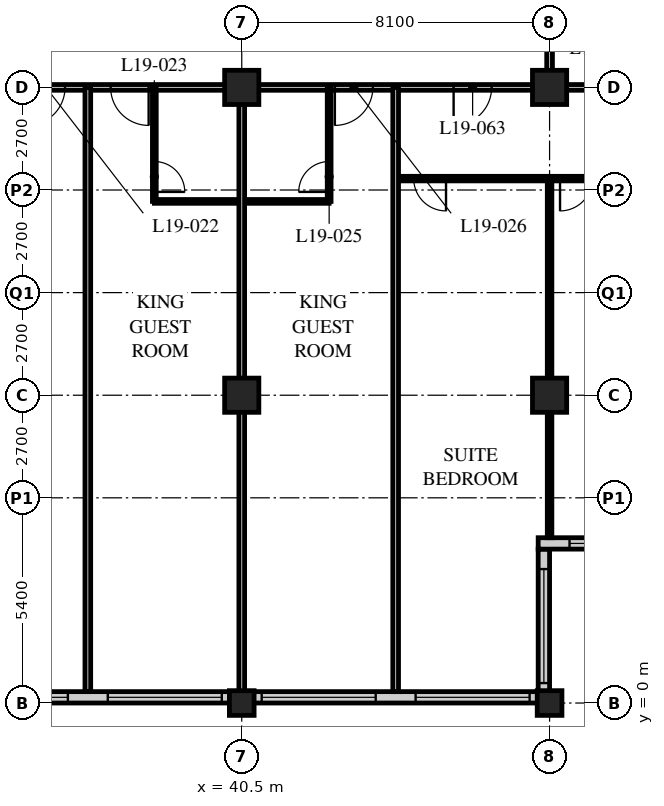
"""IFC4 building model, lengths in metres.
Left out: names, types, materials, properties, quantities, classifications, styles, units other than length and angle.
Written with IfcOpenShell. Run it as: python <this file> out.ifc"""

import sys

from ifc_helpers import new_model, si_unit, direction, frame, frame_2d, origin, origin_2d, place, context, subcontext, project, spatial, rectangle, hollow_rectangle, extrude, element, fill, save


model = new_model("IFC4")
c1 = context("Model", 3, precision=1e-05, world=origin(), true_north=direction((0.0, 1.0)))
c2 = subcontext(c1, "Body", "Model", "MODEL_VIEW")
j1 = project(units=[si_unit("LENGTHUNIT", "METRE"), si_unit("PLANEANGLEUNIT", "RADIAN")], contexts=[c1])
p1 = place(None, origin())
s1 = spatial("IfcSite", under=j1, at=p1, CompositionType="ELEMENT")
p2 = place(p1, origin())
s2 = spatial("IfcBuilding", under=s1, at=p2, CompositionType="ELEMENT")
p3 = place(p2, frame((0.0, 0.0, 77.2)))
s3 = spatial("IfcBuildingStorey", under=s2, at=p3, CompositionType="ELEMENT", Elevation=77.2)
p4 = place(p3, frame((40.5, 0.0, 0.0), z_axis=(0.0, 0.0, 1.0), x_axis=(1.0, 0.0, 0.0)))
e1 = element("IfcColumn", 1, at=p4, inside=s3, PredefinedType="COLUMN", context=c2, shape_type="SweptSolid", body=[
    extrude(hollow_rectangle(XDim=0.65, YDim=0.65, WallThickness=0.05, at=origin_2d()), origin(), (0.0, 0.0, 1.0), 3.4),
])
for number, where, z_axis, x_axis in (
    (2, (40.5, 8.1, 0.0), (0.0, 0.0, 1.0), (1.0, 0.0, 0.0)),
    (3, (40.5, 16.2, 0.0), (0.0, 0.0, 1.0), (1.0, 0.0, 0.0)),
):
    element("IfcColumn", number, at=place(p3, frame(where, z_axis=z_axis, x_axis=x_axis)), inside=s3, PredefinedType="COLUMN", context=c2, shape_type="SweptSolid", body=[
        extrude(hollow_rectangle(XDim=0.9, YDim=0.9, WallThickness=0.09, at=origin_2d()), origin(), (0.0, 0.0, 1.0), 3.4),
    ])
p5 = place(p3, frame((48.6, 0.0, 0.0), z_axis=(0.0, 0.0, 1.0), x_axis=(1.0, 0.0, 0.0)))
e4 = element("IfcColumn", 4, at=p5, inside=s3, PredefinedType="COLUMN", context=c2, shape_type="SweptSolid", body=[
    extrude(hollow_rectangle(XDim=0.65, YDim=0.65, WallThickness=0.05, at=origin_2d()), origin(), (0.0, 0.0, 1.0), 3.4),
])
for number, where, z_axis, x_axis in (
    (5, (48.6, 8.1, 0.0), (0.0, 0.0, 1.0), (1.0, 0.0, 0.0)),
    (6, (48.6, 16.2, 0.0), (0.0, 0.0, 1.0), (1.0, 0.0, 0.0)),
):
    element("IfcColumn", number, at=place(p3, frame(where, z_axis=z_axis, x_axis=x_axis)), inside=s3, PredefinedType="COLUMN", context=c2, shape_type="SweptSolid", body=[
        extrude(hollow_rectangle(XDim=0.9, YDim=0.9, WallThickness=0.09, at=origin_2d()), origin(), (0.0, 0.0, 1.0), 3.4),
    ])
p6 = place(p3, frame((8.4, 0.15, 0.0), z_axis=(0.0, 0.0, 1.0), x_axis=(1.0, 0.0, 0.0)))
e7 = element("IfcWall", 7, at=p6, inside=s3, PredefinedType="SOLIDWALL", context=c2, shape_type="SweptSolid", body=[
    extrude(rectangle(XDim=40.2, YDim=0.3, at=frame_2d((20.1, 0.0))), origin(), (0.0, 0.0, 1.0), 3.19),
])
p7 = place(p6, frame((0.225, 0.0, 0.9)))
e8 = element("IfcOpeningElement", 8, at=p7, cuts=e7, PredefinedType="OPENING", context=c2, shape_type="SweptSolid", body=[
    extrude(rectangle(XDim=3.0, YDim=1.5, at=frame_2d((1.5, 0.75))), frame((0.0, 0.16, 0.0), z_axis=(0.0, -1.0, 0.0), x_axis=(1.0, 0.0, 0.0)), (0.0, 0.0, 1.0), 0.32),
])
p8 = place(p6, frame((4.275, 0.0, 0.9)))
e9 = element("IfcOpeningElement", 9, at=p8, cuts=e7, PredefinedType="OPENING", context=c2, shape_type="SweptSolid", body=[
    extrude(rectangle(XDim=3.0, YDim=1.5, at=frame_2d((1.5, 0.75))), frame((0.0, 0.16, 0.0), z_axis=(0.0, -1.0, 0.0), x_axis=(1.0, 0.0, 0.0)), (0.0, 0.0, 1.0), 0.32),
])
p9 = place(p6, frame((8.325, 0.0, 0.9)))
e10 = element("IfcOpeningElement", 10, at=p9, cuts=e7, PredefinedType="OPENING", context=c2, shape_type="SweptSolid", body=[
    extrude(rectangle(XDim=3.0, YDim=1.5, at=frame_2d((1.5, 0.75))), frame((0.0, 0.16, 0.0), z_axis=(0.0, -1.0, 0.0), x_axis=(1.0, 0.0, 0.0)), (0.0, 0.0, 1.0), 0.32),
])
p10 = place(p6, frame((12.375, 0.0, 0.9)))
e11 = element("IfcOpeningElement", 11, at=p10, cuts=e7, PredefinedType="OPENING", context=c2, shape_type="SweptSolid", body=[
    extrude(rectangle(XDim=3.0, YDim=1.5, at=frame_2d((1.5, 0.75))), frame((0.0, 0.16, 0.0), z_axis=(0.0, -1.0, 0.0), x_axis=(1.0, 0.0, 0.0)), (0.0, 0.0, 1.0), 0.32),
])
p11 = place(p6, frame((16.425, 0.0, 0.9)))
e12 = element("IfcOpeningElement", 12, at=p11, cuts=e7, PredefinedType="OPENING", context=c2, shape_type="SweptSolid", body=[
    extrude(rectangle(XDim=3.0, YDim=1.5, at=frame_2d((1.5, 0.75))), frame((0.0, 0.16, 0.0), z_axis=(0.0, -1.0, 0.0), x_axis=(1.0, 0.0, 0.0)), (0.0, 0.0, 1.0), 0.32),
])
p12 = place(p6, frame((20.475, 0.0, 0.9)))
e13 = element("IfcOpeningElement", 13, at=p12, cuts=e7, PredefinedType="OPENING", context=c2, shape_type="SweptSolid", body=[
    extrude(rectangle(XDim=3.0, YDim=1.5, at=frame_2d((1.5, 0.75))), frame((0.0, 0.16, 0.0), z_axis=(0.0, -1.0, 0.0), x_axis=(1.0, 0.0, 0.0)), (0.0, 0.0, 1.0), 0.32),
])
p13 = place(p6, frame((24.525, 0.0, 0.9)))
e14 = element("IfcOpeningElement", 14, at=p13, cuts=e7, PredefinedType="OPENING", context=c2, shape_type="SweptSolid", body=[
    extrude(rectangle(XDim=3.0, YDim=1.5, at=frame_2d((1.5, 0.75))), frame((0.0, 0.16, 0.0), z_axis=(0.0, -1.0, 0.0), x_axis=(1.0, 0.0, 0.0)), (0.0, 0.0, 1.0), 0.32),
])
p14 = place(p6, frame((28.575, 0.0, 0.9)))
e15 = element("IfcOpeningElement", 15, at=p14, cuts=e7, PredefinedType="OPENING", context=c2, shape_type="SweptSolid", body=[
    extrude(rectangle(XDim=3.0, YDim=1.5, at=frame_2d((1.5, 0.75))), frame((0.0, 0.16, 0.0), z_axis=(0.0, -1.0, 0.0), x_axis=(1.0, 0.0, 0.0)), (0.0, 0.0, 1.0), 0.32),
])
p15 = place(p6, frame((32.625, 0.0, 0.9)))
e16 = element("IfcOpeningElement", 16, at=p15, cuts=e7, PredefinedType="OPENING", context=c2, shape_type="SweptSolid", body=[
    extrude(rectangle(XDim=3.0, YDim=1.5, at=frame_2d((1.5, 0.75))), frame((0.0, 0.16, 0.0), z_axis=(0.0, -1.0, 0.0), x_axis=(1.0, 0.0, 0.0)), (0.0, 0.0, 1.0), 0.32),
])
p16 = place(p6, frame((36.675, 0.0, 0.9)))
e17 = element("IfcOpeningElement", 17, at=p16, cuts=e7, PredefinedType="OPENING", context=c2, shape_type="SweptSolid", body=[
    extrude(rectangle(XDim=3.0, YDim=1.5, at=frame_2d((1.5, 0.75))), frame((0.0, 0.16, 0.0), z_axis=(0.0, -1.0, 0.0), x_axis=(1.0, 0.0, 0.0)), (0.0, 0.0, 1.0), 0.32),
])
p17 = place(p3, frame((48.45, 0.3, 0.0), z_axis=(0.0, 0.0, 1.0), x_axis=(0.0, 1.0, 0.0)))
e18 = element("IfcWall", 18, at=p17, inside=s3, PredefinedType="SOLIDWALL", context=c2, shape_type="SweptSolid", body=[
    extrude(rectangle(XDim=3.75, YDim=0.3, at=frame_2d((1.875, 0.0))), origin(), (0.0, 0.0, 1.0), 3.19),
])
p18 = place(p17, frame((0.225, 0.0, 0.9)))
e19 = element("IfcOpeningElement", 19, at=p18, cuts=e18, PredefinedType="OPENING", context=c2, shape_type="SweptSolid", body=[
    extrude(rectangle(XDim=3.0, YDim=1.5, at=frame_2d((1.5, 0.75))), frame((0.0, 0.16, 0.0), z_axis=(0.0, -1.0, 0.0), x_axis=(1.0, 0.0, 0.0)), (0.0, 0.0, 1.0), 0.32),
])
p19 = place(p3, frame((48.3, 4.2, 0.0), z_axis=(0.0, 0.0, 1.0), x_axis=(1.0, 0.0, 0.0)))
e20 = element("IfcWall", 20, at=p19, inside=s3, PredefinedType="SOLIDWALL", context=c2, shape_type="SweptSolid", body=[
    extrude(rectangle(XDim=4.35, YDim=0.3, at=frame_2d((2.175, 0.0))), origin(), (0.0, 0.0, 1.0), 3.19),
])
p20 = place(p19, frame((0.825, 0.0, 0.9)))
e21 = element("IfcOpeningElement", 21, at=p20, cuts=e20, PredefinedType="OPENING", context=c2, shape_type="SweptSolid", body=[
    extrude(rectangle(XDim=3.0, YDim=1.5, at=frame_2d((1.5, 0.75))), frame((0.0, 0.16, 0.0), z_axis=(0.0, -1.0, 0.0), x_axis=(1.0, 0.0, 0.0)), (0.0, 0.0, 1.0), 0.32),
])
p21 = place(p3, frame((12.15, 16.2, 0.0), z_axis=(0.0, 0.0, 1.0), x_axis=(1.0, 0.0, 0.0)))
e22 = element("IfcWall", 22, at=p21, inside=s3, PredefinedType="PARTITIONING", context=c2, shape_type="SweptSolid", body=[
    extrude(rectangle(XDim=36.45, YDim=0.15, at=frame_2d((18.225, 0.0))), origin(), (0.0, 0.0, 1.0), 2.428),
])
p22 = place(p21, frame((6.5, 0.0, 0.0)))
e23 = element("IfcOpeningElement", 23, at=p22, cuts=e22, PredefinedType="OPENING", context=c2, shape_type="SweptSolid", body=[
    extrude(rectangle(XDim=1.0, YDim=2.1, at=frame_2d((0.5, 1.05))), frame((0.0, 0.085, 0.0), z_axis=(0.0, -1.0, 0.0), x_axis=(1.0, 0.0, 0.0)), (0.0, 0.0, 1.0), 0.17),
])
p23 = place(p21, frame((8.4, 0.0, 0.0)))
e24 = element("IfcOpeningElement", 24, at=p23, cuts=e22, PredefinedType="OPENING", context=c2, shape_type="SweptSolid", body=[
    extrude(rectangle(XDim=1.0, YDim=2.1, at=frame_2d((0.5, 1.05))), frame((0.0, 0.085, 0.0), z_axis=(0.0, -1.0, 0.0), x_axis=(1.0, 0.0, 0.0)), (0.0, 0.0, 1.0), 0.17),
])
p24 = place(p21, frame((14.9, 0.0, 0.0)))
e25 = element("IfcOpeningElement", 25, at=p24, cuts=e22, PredefinedType="OPENING", context=c2, shape_type="SweptSolid", body=[
    extrude(rectangle(XDim=1.0, YDim=2.1, at=frame_2d((0.5, 1.05))), frame((0.0, 0.085, 0.0), z_axis=(0.0, -1.0, 0.0), x_axis=(1.0, 0.0, 0.0)), (0.0, 0.0, 1.0), 0.17),
])
p25 = place(p21, frame((16.5, 0.0, 0.0)))
e26 = element("IfcOpeningElement", 26, at=p25, cuts=e22, PredefinedType="OPENING", context=c2, shape_type="SweptSolid", body=[
    extrude(rectangle(XDim=1.0, YDim=2.1, at=frame_2d((0.5, 1.05))), frame((0.0, 0.085, 0.0), z_axis=(0.0, -1.0, 0.0), x_axis=(1.0, 0.0, 0.0)), (0.0, 0.0, 1.0), 0.17),
])
p26 = place(p21, frame((22.7, 0.0, 0.0)))
e27 = element("IfcOpeningElement", 27, at=p26, cuts=e22, PredefinedType="OPENING", context=c2, shape_type="SweptSolid", body=[
    extrude(rectangle(XDim=1.0, YDim=2.1, at=frame_2d((0.5, 1.05))), frame((0.0, 0.085, 0.0), z_axis=(0.0, -1.0, 0.0), x_axis=(1.0, 0.0, 0.0)), (0.0, 0.0, 1.0), 0.17),
])
p27 = place(p21, frame((24.9, 0.0, 0.0)))
e28 = element("IfcOpeningElement", 28, at=p27, cuts=e22, PredefinedType="OPENING", context=c2, shape_type="SweptSolid", body=[
    extrude(rectangle(XDim=1.0, YDim=2.1, at=frame_2d((0.5, 1.05))), frame((0.0, 0.085, 0.0), z_axis=(0.0, -1.0, 0.0), x_axis=(1.0, 0.0, 0.0)), (0.0, 0.0, 1.0), 0.17),
])
p28 = place(p21, frame((30.8, 0.0, 0.0)))
e29 = element("IfcOpeningElement", 29, at=p28, cuts=e22, PredefinedType="OPENING", context=c2, shape_type="SweptSolid", body=[
    extrude(rectangle(XDim=1.0, YDim=2.1, at=frame_2d((0.5, 1.05))), frame((0.0, 0.085, 0.0), z_axis=(0.0, -1.0, 0.0), x_axis=(1.0, 0.0, 0.0)), (0.0, 0.0, 1.0), 0.17),
])
p29 = place(p21, frame((1.525, 0.0, 0.0)))
e30 = element("IfcOpeningElement", 30, at=p29, cuts=e22, PredefinedType="OPENING", context=c2, shape_type="SweptSolid", body=[
    extrude(rectangle(XDim=1.0, YDim=2.1, at=frame_2d((0.5, 1.05))), frame((0.0, 0.085, 0.0), z_axis=(0.0, -1.0, 0.0), x_axis=(1.0, 0.0, 0.0)), (0.0, 0.0, 1.0), 0.17),
])
p30 = place(p21, frame((33.925, 0.0, 0.0)))
e31 = element("IfcOpeningElement", 31, at=p30, cuts=e22, PredefinedType="OPENING", context=c2, shape_type="SweptSolid", body=[
    extrude(rectangle(XDim=1.0, YDim=2.1, at=frame_2d((0.5, 1.05))), frame((0.0, 0.085, 0.0), z_axis=(0.0, -1.0, 0.0), x_axis=(1.0, 0.0, 0.0)), (0.0, 0.0, 1.0), 0.17),
])
p31 = place(p3, frame((48.6, 16.2, 0.0), z_axis=(0.0, 0.0, 1.0), x_axis=(0.0, 1.0, 0.0)))
e32 = element("IfcWall", 32, at=p31, inside=s3, PredefinedType="PARTITIONING", context=c2, shape_type="SweptSolid", body=[
    extrude(rectangle(XDim=26.1, YDim=0.15, at=frame_2d((13.05, 0.0))), origin(), (0.0, 0.0, 1.0), 2.428),
])
p32 = place(p31, frame((2.75, 0.0, 0.0)))
e33 = element("IfcOpeningElement", 33, at=p32, cuts=e32, PredefinedType="OPENING", context=c2, shape_type="SweptSolid", body=[
    extrude(rectangle(XDim=1.0, YDim=2.1, at=frame_2d((0.5, 1.05))), frame((0.0, 0.085, 0.0), z_axis=(0.0, -1.0, 0.0), x_axis=(1.0, 0.0, 0.0)), (0.0, 0.0, 1.0), 0.17),
])
p33 = place(p31, frame((4.65, 0.0, 0.0)))
e34 = element("IfcOpeningElement", 34, at=p33, cuts=e32, PredefinedType="OPENING", context=c2, shape_type="SweptSolid", body=[
    extrude(rectangle(XDim=1.0, YDim=2.1, at=frame_2d((0.5, 1.05))), frame((0.0, 0.085, 0.0), z_axis=(0.0, -1.0, 0.0), x_axis=(1.0, 0.0, 0.0)), (0.0, 0.0, 1.0), 0.17),
])
p34 = place(p31, frame((13.55, 0.0, 0.0)))
e35 = element("IfcOpeningElement", 35, at=p34, cuts=e32, PredefinedType="OPENING", context=c2, shape_type="SweptSolid", body=[
    extrude(rectangle(XDim=1.0, YDim=2.1, at=frame_2d((0.5, 1.05))), frame((0.0, 0.085, 0.0), z_axis=(0.0, -1.0, 0.0), x_axis=(1.0, 0.0, 0.0)), (0.0, 0.0, 1.0), 0.17),
])
p35 = place(p31, frame((21.65, 0.0, 0.0)))
e36 = element("IfcOpeningElement", 36, at=p35, cuts=e32, PredefinedType="OPENING", context=c2, shape_type="SweptSolid", body=[
    extrude(rectangle(XDim=1.0, YDim=2.1, at=frame_2d((0.5, 1.05))), frame((0.0, 0.085, 0.0), z_axis=(0.0, -1.0, 0.0), x_axis=(1.0, 0.0, 0.0)), (0.0, 0.0, 1.0), 0.17),
])
p36 = place(p3, frame((36.45, 16.2, 0.0), z_axis=(0.0, 0.0, 1.0), x_axis=(0.0, -1.0, 0.0)))
e37 = element("IfcWall", 37, at=p36, inside=s3, PredefinedType="PARTITIONING", context=c2, shape_type="SweptSolid", body=[
    extrude(rectangle(XDim=15.9, YDim=0.15, at=frame_2d((7.95, 0.0))), origin(), (0.0, 0.0, 1.0), 3.19),
])
p37 = place(p3, frame((38.2, 13.2, 0.0), z_axis=(0.0, 0.0, 1.0), x_axis=(1.0, 0.0, 0.0)))
e38 = element("IfcWall", 38, at=p37, inside=s3, PredefinedType="PARTITIONING", context=c2, shape_type="SweptSolid", body=[
    extrude(rectangle(XDim=4.6, YDim=0.1, at=frame_2d((2.3, 0.0))), origin(), (0.0, 0.0, 1.0), 3.19),
])
p38 = place(p3, frame((38.2, 16.2, 0.0), z_axis=(0.0, 0.0, 1.0), x_axis=(0.0, -1.0, 0.0)))
e39 = element("IfcWall", 39, at=p38, inside=s3, PredefinedType="PARTITIONING", context=c2, shape_type="SweptSolid", body=[
    extrude(rectangle(XDim=3.0, YDim=0.1, at=frame_2d((1.5, 0.0))), origin(), (0.0, 0.0, 1.0), 3.19),
])
p39 = place(p38, frame((1.95, 0.0, 0.0)))
e40 = element("IfcOpeningElement", 40, at=p39, cuts=e39, PredefinedType="OPENING", context=c2, shape_type="SweptSolid", body=[
    extrude(rectangle(XDim=0.8, YDim=2.1, at=frame_2d((0.4, 1.05))), frame((0.0, 0.06, 0.0), z_axis=(0.0, -1.0, 0.0), x_axis=(1.0, 0.0, 0.0)), (0.0, 0.0, 1.0), 0.12),
])
p40 = place(p3, frame((40.5, 16.2, 0.0), z_axis=(0.0, 0.0, 1.0), x_axis=(0.0, -1.0, 0.0)))
e41 = element("IfcWall", 41, at=p40, inside=s3, PredefinedType="PARTITIONING", context=c2, shape_type="SweptSolid", body=[
    extrude(rectangle(XDim=15.9, YDim=0.15, at=frame_2d((7.95, 0.0))), origin(), (0.0, 0.0, 1.0), 2.428),
])
p41 = place(p3, frame((42.8, 16.2, 0.0), z_axis=(0.0, 0.0, 1.0), x_axis=(0.0, -1.0, 0.0)))
e42 = element("IfcWall", 42, at=p41, inside=s3, PredefinedType="PARTITIONING", context=c2, shape_type="SweptSolid", body=[
    extrude(rectangle(XDim=3.0, YDim=0.1, at=frame_2d((1.5, 0.0))), origin(), (0.0, 0.0, 1.0), 3.19),
])
p42 = place(p41, frame((1.95, 0.0, 0.0)))
e43 = element("IfcOpeningElement", 43, at=p42, cuts=e42, PredefinedType="OPENING", context=c2, shape_type="SweptSolid", body=[
    extrude(rectangle(XDim=0.8, YDim=2.1, at=frame_2d((0.4, 1.05))), frame((0.0, 0.06, 0.0), z_axis=(0.0, -1.0, 0.0), x_axis=(1.0, 0.0, 0.0)), (0.0, 0.0, 1.0), 0.12),
])
p43 = place(p3, frame((44.55, 13.8, 0.0), z_axis=(0.0, 0.0, 1.0), x_axis=(1.0, 0.0, 0.0)))
e44 = element("IfcWall", 44, at=p43, inside=s3, PredefinedType="PARTITIONING", context=c2, shape_type="SweptSolid", body=[
    extrude(rectangle(XDim=8.05, YDim=0.12, at=frame_2d((4.025, 0.0))), origin(), (0.0, 0.0, 1.0), 3.19),
])
p44 = place(p43, frame((0.475, 0.0, 0.0)))
e45 = element("IfcOpeningElement", 45, at=p44, cuts=e44, PredefinedType="OPENING", context=c2, shape_type="SweptSolid", body=[
    extrude(rectangle(XDim=0.85, YDim=2.1, at=frame_2d((0.425, 1.05))), frame((0.0, 0.07, 0.0), z_axis=(0.0, -1.0, 0.0), x_axis=(1.0, 0.0, 0.0)), (0.0, 0.0, 1.0), 0.14),
])
p45 = place(p43, frame((4.325, 0.0, 0.0)))
e46 = element("IfcOpeningElement", 46, at=p45, cuts=e44, PredefinedType="OPENING", context=c2, shape_type="SweptSolid", body=[
    extrude(rectangle(XDim=0.85, YDim=2.1, at=frame_2d((0.425, 1.05))), frame((0.0, 0.07, 0.0), z_axis=(0.0, -1.0, 0.0), x_axis=(1.0, 0.0, 0.0)), (0.0, 0.0, 1.0), 0.14),
])
p46 = place(p3, frame((48.6, 13.8, 0.0), z_axis=(0.0, 0.0, 1.0), x_axis=(0.0, -1.0, 0.0)))
e47 = element("IfcWall", 47, at=p46, inside=s3, PredefinedType="PARTITIONING", context=c2, shape_type="SweptSolid", body=[
    extrude(rectangle(XDim=9.45, YDim=0.12, at=frame_2d((4.725, 0.0))), origin(), (0.0, 0.0, 1.0), 2.428),
])
p47 = place(p3, frame((48.6, 16.2, 0.0), z_axis=(0.0, 0.0, 1.0), x_axis=(1.0, 0.0, 0.0)))
e48 = element("IfcWall", 48, at=p47, inside=s3, PredefinedType="PARTITIONING", context=c2, shape_type="SweptSolid", body=[
    extrude(rectangle(XDim=7.8, YDim=0.15, at=frame_2d((3.9, 0.0))), origin(), (0.0, 0.0, 1.0), 2.428),
])
p48 = place(p3, frame((44.55, 16.2, 0.0), z_axis=(0.0, 0.0, 1.0), x_axis=(0.0, -1.0, 0.0)))
e49 = element("IfcWall", 49, at=p48, inside=s3, PredefinedType="PARTITIONING", context=c2, shape_type="SweptSolid", body=[
    extrude(rectangle(XDim=15.9, YDim=0.15, at=frame_2d((7.95, 0.0))), origin(), (0.0, 0.0, 1.0), 3.19),
])
p49 = place(p13, origin())
e50 = element("IfcWindow", 50, at=p49, inside=s3, PartitioningType="SINGLE_PANEL", PredefinedType="WINDOW", context=c2, shape_type="SweptSolid", body=[
    extrude(rectangle(XDim=3.0, YDim=1.5, at=frame_2d((1.5, 0.75))), frame((0.0, 0.03, 0.0), z_axis=(0.0, -1.0, 0.0), x_axis=(1.0, 0.0, 0.0)), (0.0, 0.0, 1.0), 0.06),
])
fill(e14, e50)
p50 = place(p14, origin())
e51 = element("IfcWindow", 51, at=p50, inside=s3, PartitioningType="SINGLE_PANEL", PredefinedType="WINDOW", context=c2, shape_type="SweptSolid", body=[
    extrude(rectangle(XDim=3.0, YDim=1.5, at=frame_2d((1.5, 0.75))), frame((0.0, 0.03, 0.0), z_axis=(0.0, -1.0, 0.0), x_axis=(1.0, 0.0, 0.0)), (0.0, 0.0, 1.0), 0.06),
])
fill(e15, e51)
p51 = place(p15, origin())
e52 = element("IfcWindow", 52, at=p51, inside=s3, PartitioningType="SINGLE_PANEL", PredefinedType="WINDOW", context=c2, shape_type="SweptSolid", body=[
    extrude(rectangle(XDim=3.0, YDim=1.5, at=frame_2d((1.5, 0.75))), frame((0.0, 0.03, 0.0), z_axis=(0.0, -1.0, 0.0), x_axis=(1.0, 0.0, 0.0)), (0.0, 0.0, 1.0), 0.06),
])
fill(e16, e52)
p52 = place(p16, origin())
e53 = element("IfcWindow", 53, at=p52, inside=s3, PartitioningType="SINGLE_PANEL", PredefinedType="WINDOW", context=c2, shape_type="SweptSolid", body=[
    extrude(rectangle(XDim=3.0, YDim=1.5, at=frame_2d((1.5, 0.75))), frame((0.0, 0.03, 0.0), z_axis=(0.0, -1.0, 0.0), x_axis=(1.0, 0.0, 0.0)), (0.0, 0.0, 1.0), 0.06),
])
fill(e17, e53)
p53 = place(p18, origin())
e54 = element("IfcWindow", 54, at=p53, inside=s3, PartitioningType="SINGLE_PANEL", PredefinedType="WINDOW", context=c2, shape_type="SweptSolid", body=[
    extrude(rectangle(XDim=3.0, YDim=1.5, at=frame_2d((1.5, 0.75))), frame((0.0, 0.03, 0.0), z_axis=(0.0, -1.0, 0.0), x_axis=(1.0, 0.0, 0.0)), (0.0, 0.0, 1.0), 0.06),
])
fill(e19, e54)
p54 = place(p20, origin())
e55 = element("IfcWindow", 55, at=p54, inside=s3, PartitioningType="SINGLE_PANEL", PredefinedType="WINDOW", context=c2, shape_type="SweptSolid", body=[
    extrude(rectangle(XDim=3.0, YDim=1.5, at=frame_2d((1.5, 0.75))), frame((0.0, 0.03, 0.0), z_axis=(0.0, -1.0, 0.0), x_axis=(1.0, 0.0, 0.0)), (0.0, 0.0, 1.0), 0.06),
])
fill(e21, e55)
p55 = place(p26, origin())
e56 = element("IfcDoor", 56, at=p55, inside=s3, OperationType="SINGLE_SWING_RIGHT", PredefinedType="DOOR", context=c2, shape_type="SweptSolid", body=[
    extrude(rectangle(XDim=1.0, YDim=2.1, at=frame_2d((0.5, 1.05))), frame((0.0, 0.025, 0.0), z_axis=(0.0, -1.0, 0.0), x_axis=(1.0, 0.0, 0.0)), (0.0, 0.0, 1.0), 0.05),
])
fill(e27, e56)
p56 = place(p39, origin())
e57 = element("IfcDoor", 57, at=p56, inside=s3, OperationType="SINGLE_SWING_RIGHT", PredefinedType="DOOR", context=c2, shape_type="SweptSolid", body=[
    extrude(rectangle(XDim=0.8, YDim=2.1, at=frame_2d((0.4, 1.05))), frame((0.0, 0.025, 0.0), z_axis=(0.0, -1.0, 0.0), x_axis=(1.0, 0.0, 0.0)), (0.0, 0.0, 1.0), 0.05),
])
fill(e40, e57)
p57 = place(p27, origin())
e58 = element("IfcDoor", 58, at=p57, inside=s3, OperationType="SINGLE_SWING_LEFT", PredefinedType="DOOR", context=c2, shape_type="SweptSolid", body=[
    extrude(rectangle(XDim=1.0, YDim=2.1, at=frame_2d((0.5, 1.05))), frame((0.0, 0.025, 0.0), z_axis=(0.0, -1.0, 0.0), x_axis=(1.0, 0.0, 0.0)), (0.0, 0.0, 1.0), 0.05),
])
fill(e28, e58)
p58 = place(p42, origin())
e59 = element("IfcDoor", 59, at=p58, inside=s3, OperationType="SINGLE_SWING_LEFT", PredefinedType="DOOR", context=c2, shape_type="SweptSolid", body=[
    extrude(rectangle(XDim=0.8, YDim=2.1, at=frame_2d((0.4, 1.05))), frame((0.0, 0.025, 0.0), z_axis=(0.0, -1.0, 0.0), x_axis=(1.0, 0.0, 0.0)), (0.0, 0.0, 1.0), 0.05),
])
fill(e43, e59)
p59 = place(p28, origin())
e60 = element("IfcDoor", 60, at=p59, inside=s3, OperationType="SINGLE_SWING_RIGHT", PredefinedType="DOOR", context=c2, shape_type="SweptSolid", body=[
    extrude(rectangle(XDim=1.0, YDim=2.1, at=frame_2d((0.5, 1.05))), frame((0.0, 0.025, 0.0), z_axis=(0.0, -1.0, 0.0), x_axis=(1.0, 0.0, 0.0)), (0.0, 0.0, 1.0), 0.05),
])
fill(e29, e60)
p60 = place(p30, origin())
e61 = element("IfcDoor", 61, at=p60, inside=s3, OperationType="SINGLE_SWING_RIGHT", PredefinedType="DOOR", context=c2, shape_type="SweptSolid", body=[
    extrude(rectangle(XDim=1.0, YDim=2.1, at=frame_2d((0.5, 1.05))), frame((0.0, 0.025, 0.0), z_axis=(0.0, -1.0, 0.0), x_axis=(1.0, 0.0, 0.0)), (0.0, 0.0, 1.0), 0.05),
])
fill(e31, e61)
p61 = place(p44, origin())
e62 = element("IfcDoor", 62, at=p61, inside=s3, OperationType="SINGLE_SWING_LEFT", PredefinedType="DOOR", context=c2, shape_type="SweptSolid", body=[
    extrude(rectangle(XDim=0.85, YDim=2.1, at=frame_2d((0.425, 1.05))), frame((0.0, 0.025, 0.0), z_axis=(0.0, -1.0, 0.0), x_axis=(1.0, 0.0, 0.0)), (0.0, 0.0, 1.0), 0.05),
])
fill(e45, e62)
p62 = place(p45, origin())
e63 = element("IfcDoor", 63, at=p62, inside=s3, OperationType="SINGLE_SWING_RIGHT", PredefinedType="DOOR", context=c2, shape_type="SweptSolid", body=[
    extrude(rectangle(XDim=0.85, YDim=2.1, at=frame_2d((0.425, 1.05))), frame((0.0, 0.025, 0.0), z_axis=(0.0, -1.0, 0.0), x_axis=(1.0, 0.0, 0.0)), (0.0, 0.0, 1.0), 0.05),
])
fill(e46, e63)
save(model, sys.argv[1])
